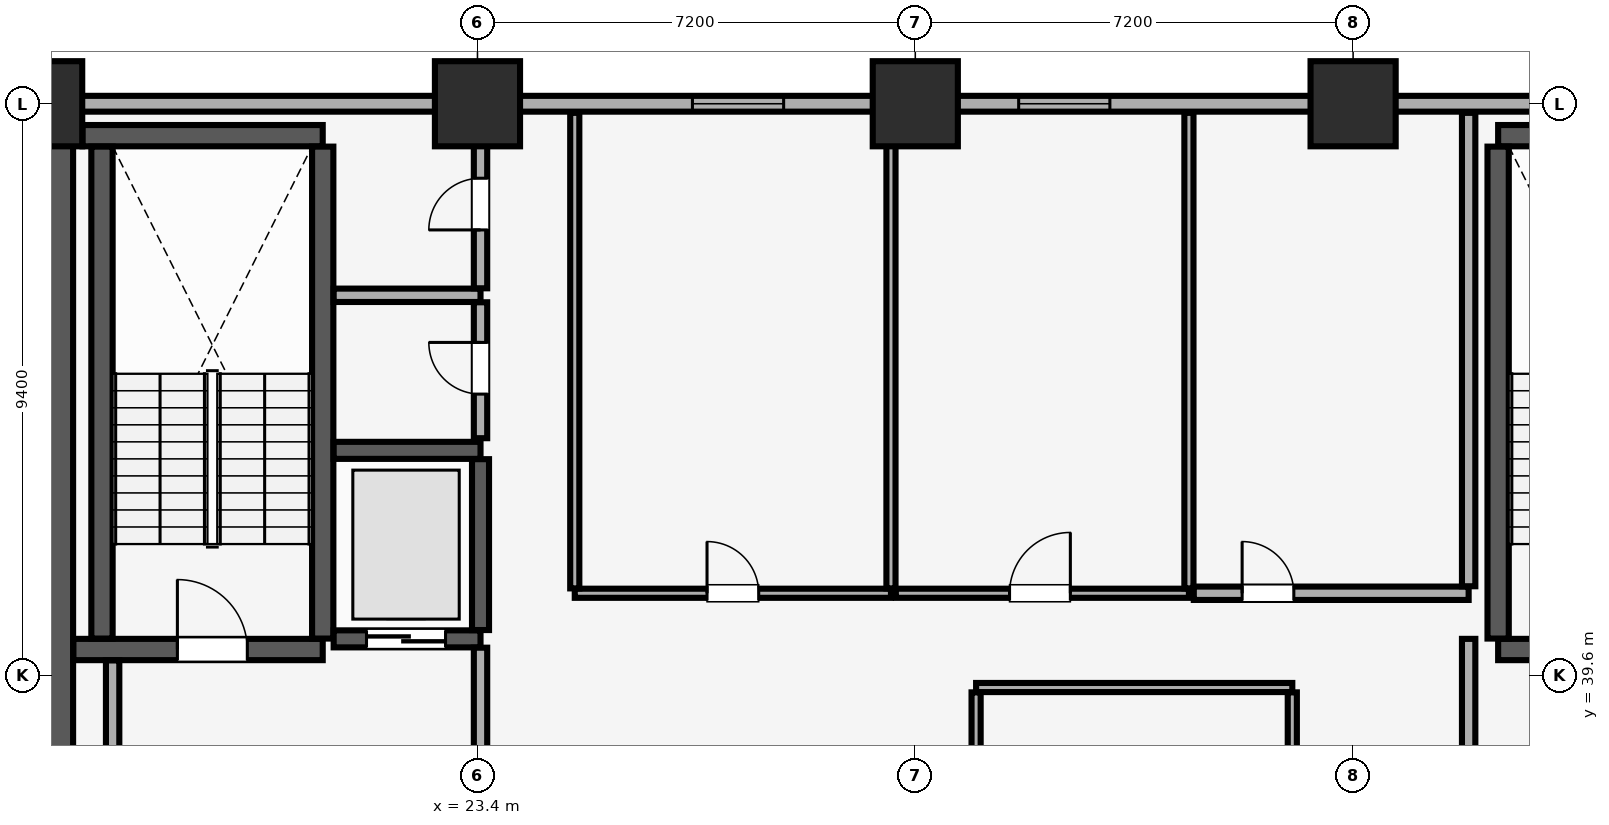
"""IFC4 building model, lengths in metres.
Left out: names, types, materials, properties, quantities, classifications, styles, units other than length and angle.
Written with IfcOpenShell. Run it as: python <this file> out.ifc"""

import sys

from ifc_helpers import new_model, si_unit, direction, frame, frame_2d, origin, origin_2d, place, context, subcontext, project, spatial, rectangle, extrude, element, fill, save


model = new_model("IFC4")
c1 = context("Model", 3, precision=1e-05, world=origin(), true_north=direction((0.0, 1.0)))
c2 = subcontext(c1, "Body", "Model", "MODEL_VIEW")
j1 = project(units=[si_unit("LENGTHUNIT", "METRE"), si_unit("PLANEANGLEUNIT", "RADIAN")], contexts=[c1])
p1 = place(None, origin())
s1 = spatial("IfcSite", under=j1, at=p1, CompositionType="ELEMENT")
p2 = place(p1, origin())
s2 = spatial("IfcBuilding", under=s1, at=p2, CompositionType="ELEMENT")
p3 = place(p2, frame((0.0, 0.0, 31.4)))
s3 = spatial("IfcBuildingStorey", under=s2, at=p3, CompositionType="ELEMENT", Elevation=31.4)
for number, where, z_axis, x_axis in (
    (1, (16.2, 49.0, 0.0), (0.0, 0.0, 1.0), (1.0, 0.0, 0.0)),
    (2, (23.4, 49.0, 0.0), (0.0, 0.0, 1.0), (1.0, 0.0, 0.0)),
    (3, (30.6, 49.0, 0.0), (0.0, 0.0, 1.0), (1.0, 0.0, 0.0)),
    (4, (37.8, 49.0, 0.0), (0.0, 0.0, 1.0), (1.0, 0.0, 0.0)),
):
    element("IfcColumn", number, at=place(p3, frame(where, z_axis=z_axis, x_axis=x_axis)), inside=s3, PredefinedType="COLUMN", context=c2, shape_type="SweptSolid", body=[
        extrude(rectangle(XDim=1.4, YDim=1.4, at=origin_2d()), origin(), (0.0, 0.0, 1.0), 3.51),
    ])
p4 = place(p3, frame((79.8, 49.0, 0.0), z_axis=(0.0, 0.0, 1.0), x_axis=(-1.0, 0.0, 0.0)))
e5 = element("IfcWall", 5, at=p4, inside=s3, PredefinedType="SOLIDWALL", context=c2, shape_type="SweptSolid", body=[
    extrude(rectangle(XDim=75.6, YDim=0.26, at=frame_2d((37.8, 0.0))), origin(), (0.0, 0.0, 1.0), 2.56),
])
p5 = place(p4, frame((72.565, 0.0, 0.85)))
e6 = element("IfcOpeningElement", 6, at=p5, cuts=e5, PredefinedType="OPENING", context=c2, shape_type="SweptSolid", body=[
    extrude(rectangle(XDim=1.5, YDim=1.4, at=frame_2d((0.75, 0.7))), frame((0.0, 0.14, 0.0), z_axis=(0.0, -1.0, 0.0), x_axis=(1.0, 0.0, 0.0)), (0.0, 0.0, 1.0), 0.28),
])
p6 = place(p4, frame((67.45, 0.0, 0.85)))
e7 = element("IfcOpeningElement", 7, at=p6, cuts=e5, PredefinedType="OPENING", context=c2, shape_type="SweptSolid", body=[
    extrude(rectangle(XDim=1.5, YDim=1.4, at=frame_2d((0.75, 0.7))), frame((0.0, 0.14, 0.0), z_axis=(0.0, -1.0, 0.0), x_axis=(1.0, 0.0, 0.0)), (0.0, 0.0, 1.0), 0.28),
])
p7 = place(p4, frame((6.65, 0.0, 0.85)))
e8 = element("IfcOpeningElement", 8, at=p7, cuts=e5, PredefinedType="OPENING", context=c2, shape_type="SweptSolid", body=[
    extrude(rectangle(XDim=1.5, YDim=1.4, at=frame_2d((0.75, 0.7))), frame((0.0, 0.14, 0.0), z_axis=(0.0, -1.0, 0.0), x_axis=(1.0, 0.0, 0.0)), (0.0, 0.0, 1.0), 0.28),
])
p8 = place(p4, frame((1.535, 0.0, 0.85)))
e9 = element("IfcOpeningElement", 9, at=p8, cuts=e5, PredefinedType="OPENING", context=c2, shape_type="SweptSolid", body=[
    extrude(rectangle(XDim=1.5, YDim=1.4, at=frame_2d((0.75, 0.7))), frame((0.0, 0.14, 0.0), z_axis=(0.0, -1.0, 0.0), x_axis=(1.0, 0.0, 0.0)), (0.0, 0.0, 1.0), 0.28),
])
p9 = place(p4, frame((51.365, 0.0, 0.9)))
e10 = element("IfcOpeningElement", 10, at=p9, cuts=e5, PredefinedType="OPENING", context=c2, shape_type="SweptSolid", body=[
    extrude(rectangle(XDim=1.5, YDim=1.4, at=frame_2d((0.75, 0.7))), frame((0.0, 0.14, 0.0), z_axis=(0.0, -1.0, 0.0), x_axis=(1.0, 0.0, 0.0)), (0.0, 0.0, 1.0), 0.28),
])
p10 = place(p4, frame((46.0, 0.0, 0.9)))
e11 = element("IfcOpeningElement", 11, at=p10, cuts=e5, PredefinedType="OPENING", context=c2, shape_type="SweptSolid", body=[
    extrude(rectangle(XDim=1.5, YDim=1.4, at=frame_2d((0.75, 0.7))), frame((0.0, 0.14, 0.0), z_axis=(0.0, -1.0, 0.0), x_axis=(1.0, 0.0, 0.0)), (0.0, 0.0, 1.0), 0.28),
])
p11 = place(p4, frame((29.15, 0.0, 0.9)))
e12 = element("IfcOpeningElement", 12, at=p11, cuts=e5, PredefinedType="OPENING", context=c2, shape_type="SweptSolid", body=[
    extrude(rectangle(XDim=1.5, YDim=1.4, at=frame_2d((0.75, 0.7))), frame((0.0, 0.14, 0.0), z_axis=(0.0, -1.0, 0.0), x_axis=(1.0, 0.0, 0.0)), (0.0, 0.0, 1.0), 0.28),
])
p12 = place(p4, frame((23.485, 0.0, 0.9)))
e13 = element("IfcOpeningElement", 13, at=p12, cuts=e5, PredefinedType="OPENING", context=c2, shape_type="SweptSolid", body=[
    extrude(rectangle(XDim=1.5, YDim=1.4, at=frame_2d((0.75, 0.7))), frame((0.0, 0.14, 0.0), z_axis=(0.0, -1.0, 0.0), x_axis=(1.0, 0.0, 0.0)), (0.0, 0.0, 1.0), 0.28),
])
p13 = place(p3, frame((16.2, 29.4, 0.0), z_axis=(0.0, 0.0, 1.0), x_axis=(0.0, 1.0, 0.0)))
e14 = element("IfcWall", 14, at=p13, inside=s3, PredefinedType="SHEAR", context=c2, shape_type="SweptSolid", body=[
    extrude(rectangle(XDim=19.2, YDim=1.1, at=frame_2d((9.6, 0.0))), origin(), (0.0, 0.0, 1.0), 3.51),
])
p14 = place(p3, frame((16.755, 40.025, 0.0), z_axis=(0.0, 0.0, 1.0), x_axis=(1.0, 0.0, 0.0)))
e15 = element("IfcWall", 15, at=p14, inside=s3, PredefinedType="SHEAR", context=c2, shape_type="SweptSolid", body=[
    extrude(rectangle(XDim=4.1, YDim=0.35, at=frame_2d((2.05, 0.0))), origin(), (0.0, 0.0, 1.0), 3.51),
])
p15 = place(p14, frame((1.71, 0.0, 0.0)))
e16 = element("IfcOpeningElement", 16, at=p15, cuts=e15, PredefinedType="OPENING", context=c2, shape_type="SweptSolid", body=[
    extrude(rectangle(XDim=1.15, YDim=2.15, at=frame_2d((0.575, 1.075))), frame((0.0, 0.185, 0.0), z_axis=(0.0, -1.0, 0.0), x_axis=(1.0, 0.0, 0.0)), (0.0, 0.0, 1.0), 0.37),
])
p16 = place(p3, frame((16.905, 48.475, 0.0), z_axis=(0.0, 0.0, 1.0), x_axis=(1.0, 0.0, 0.0)))
e17 = element("IfcWall", 17, at=p16, inside=s3, PredefinedType="SHEAR", context=c2, shape_type="SweptSolid", body=[
    extrude(rectangle(XDim=3.95, YDim=0.35, at=frame_2d((1.975, 0.0))), origin(), (0.0, 0.0, 1.0), 3.51),
])
for number, where, z_axis, x_axis in (
    (18, (17.225, 40.205, 0.0), (0.0, 0.0, 1.0), (0.0, 1.0, 0.0)),
    (19, (20.855, 40.205, 0.0), (0.0, 0.0, 1.0), (0.0, 1.0, 0.0)),
):
    element("IfcWall", number, at=place(p3, frame(where, z_axis=z_axis, x_axis=x_axis)), inside=s3, PredefinedType="SHEAR", context=c2, shape_type="SweptSolid", body=[
        extrude(rectangle(XDim=8.09, YDim=0.35, at=frame_2d((4.045, 0.0))), origin(), (0.0, 0.0, 1.0), 3.51),
    ])
p17 = place(p3, frame((40.185, 40.025, 0.0), z_axis=(0.0, 0.0, 1.0), x_axis=(1.0, 0.0, 0.0)))
e20 = element("IfcWall", 20, at=p17, inside=s3, PredefinedType="SHEAR", context=c2, shape_type="SweptSolid", body=[
    extrude(rectangle(XDim=3.63, YDim=0.35, at=frame_2d((1.815, 0.0))), origin(), (0.0, 0.0, 1.0), 3.51),
])
p18 = place(p17, frame((1.24, 0.0, 0.0)))
e21 = element("IfcOpeningElement", 21, at=p18, cuts=e20, PredefinedType="OPENING", context=c2, shape_type="SweptSolid", body=[
    extrude(rectangle(XDim=1.15, YDim=2.15, at=frame_2d((0.575, 1.075))), frame((0.0, 0.185, 0.0), z_axis=(0.0, -1.0, 0.0), x_axis=(1.0, 0.0, 0.0)), (0.0, 0.0, 1.0), 0.37),
])
p19 = place(p3, frame((40.185, 48.475, 0.0), z_axis=(0.0, 0.0, 1.0), x_axis=(1.0, 0.0, 0.0)))
e22 = element("IfcWall", 22, at=p19, inside=s3, PredefinedType="SHEAR", context=c2, shape_type="SweptSolid", body=[
    extrude(rectangle(XDim=3.63, YDim=0.35, at=frame_2d((1.815, 0.0))), origin(), (0.0, 0.0, 1.0), 3.51),
])
p20 = place(p3, frame((40.185, 40.205, 0.0), z_axis=(0.0, 0.0, 1.0), x_axis=(0.0, 1.0, 0.0)))
e23 = element("IfcWall", 23, at=p20, inside=s3, PredefinedType="SHEAR", context=c2, shape_type="SweptSolid", body=[
    extrude(rectangle(XDim=8.09, YDim=0.35, at=frame_2d((4.045, 0.0))), origin(), (0.0, 0.0, 1.0), 3.51),
])
p21 = place(p3, frame((21.035, 40.2, 0.0), z_axis=(0.0, 0.0, 1.0), x_axis=(1.0, 0.0, 0.0)))
e24 = element("IfcWall", 24, at=p21, inside=s3, PredefinedType="SHEAR", context=c2, shape_type="SweptSolid", body=[
    extrude(rectangle(XDim=2.415, YDim=0.28, at=frame_2d((1.208, 0.0))), origin(), (0.0, 0.0, 1.0), 3.51),
])
p22 = place(p21, frame((0.54, 0.0, 0.0)))
e25 = element("IfcOpeningElement", 25, at=p22, cuts=e24, PredefinedType="OPENING", context=c2, shape_type="SweptSolid", body=[
    extrude(rectangle(XDim=1.3, YDim=2.3, at=frame_2d((0.65, 1.15))), frame((0.0, 0.15, 0.0), z_axis=(0.0, -1.0, 0.0), x_axis=(1.0, 0.0, 0.0)), (0.0, 0.0, 1.0), 0.3),
])
p23 = place(p3, frame((21.035, 43.3, 0.0), z_axis=(0.0, 0.0, 1.0), x_axis=(1.0, 0.0, 0.0)))
e26 = element("IfcWall", 26, at=p23, inside=s3, PredefinedType="SHEAR", context=c2, shape_type="SweptSolid", body=[
    extrude(rectangle(XDim=2.415, YDim=0.28, at=frame_2d((1.208, 0.0))), origin(), (0.0, 0.0, 1.0), 3.51),
])
p24 = place(p3, frame((23.45, 40.345, 0.0), z_axis=(0.0, 0.0, 1.0), x_axis=(0.0, 1.0, 0.0)))
e27 = element("IfcWall", 27, at=p24, inside=s3, PredefinedType="SHEAR", context=c2, shape_type="SweptSolid", body=[
    extrude(rectangle(XDim=2.81, YDim=0.28, at=frame_2d((1.405, 0.0))), origin(), (0.0, 0.0, 1.0), 3.51),
])
p25 = place(p3, frame((17.4, 34.415, 0.0), z_axis=(0.0, 0.0, 1.0), x_axis=(0.0, 1.0, 0.0)))
e28 = element("IfcWall", 28, at=p25, inside=s3, PredefinedType="PARTITIONING", context=c2, shape_type="SweptSolid", body=[
    extrude(rectangle(XDim=5.43, YDim=0.22, at=frame_2d((2.715, 0.0))), origin(), (0.0, 0.0, 1.0), 3.51),
])
p26 = place(p3, frame((23.45, 34.415, 0.0), z_axis=(0.0, 0.0, 1.0), x_axis=(0.0, 1.0, 0.0)))
e29 = element("IfcWall", 29, at=p26, inside=s3, PredefinedType="PARTITIONING", context=c2, shape_type="SweptSolid", body=[
    extrude(rectangle(XDim=5.64, YDim=0.22, at=frame_2d((2.82, 0.0))), origin(), (0.0, 0.0, 1.0), 3.51),
])
p27 = place(p3, frame((39.7, 34.415, 0.0), z_axis=(0.0, 0.0, 1.0), x_axis=(0.0, 1.0, 0.0)))
e30 = element("IfcWall", 30, at=p27, inside=s3, PredefinedType="PARTITIONING", context=c2, shape_type="SweptSolid", body=[
    extrude(rectangle(XDim=5.785, YDim=0.22, at=frame_2d((2.893, 0.0))), origin(), (0.0, 0.0, 1.0), 3.51),
])
p28 = place(p3, frame((21.035, 45.85, 0.0), z_axis=(0.0, 0.0, 1.0), x_axis=(1.0, 0.0, 0.0)))
e31 = element("IfcWall", 31, at=p28, inside=s3, PredefinedType="PARTITIONING", context=c2, shape_type="SweptSolid", body=[
    extrude(rectangle(XDim=2.415, YDim=0.22, at=frame_2d((1.208, 0.0))), origin(), (0.0, 0.0, 1.0), 3.51),
])
p29 = place(p3, frame((23.45, 43.5, 0.0), z_axis=(0.0, 0.0, 1.0), x_axis=(0.0, 1.0, 0.0)))
e32 = element("IfcWall", 32, at=p29, inside=s3, PredefinedType="PARTITIONING", context=c2, shape_type="SweptSolid", body=[
    extrude(rectangle(XDim=2.235, YDim=0.22, at=frame_2d((1.118, 0.0))), origin(), (0.0, 0.0, 1.0), 3.51),
])
p30 = place(p29, frame((0.725, 0.0, 0.0)))
e33 = element("IfcOpeningElement", 33, at=p30, cuts=e32, PredefinedType="OPENING", context=c2, shape_type="SweptSolid", body=[
    extrude(rectangle(XDim=0.85, YDim=2.1, at=frame_2d((0.425, 1.05))), frame((0.0, 0.12, 0.0), z_axis=(0.0, -1.0, 0.0), x_axis=(1.0, 0.0, 0.0)), (0.0, 0.0, 1.0), 0.24),
])
p31 = place(p3, frame((23.45, 45.965, 0.0), z_axis=(0.0, 0.0, 1.0), x_axis=(0.0, 1.0, 0.0)))
e34 = element("IfcWall", 34, at=p31, inside=s3, PredefinedType="PARTITIONING", context=c2, shape_type="SweptSolid", body=[
    extrude(rectangle(XDim=2.885, YDim=0.22, at=frame_2d((1.442, 0.0))), origin(), (0.0, 0.0, 1.0), 3.51),
])
p32 = place(p31, frame((0.96, 0.0, 0.0)))
e35 = element("IfcOpeningElement", 35, at=p32, cuts=e34, PredefinedType="OPENING", context=c2, shape_type="SweptSolid", body=[
    extrude(rectangle(XDim=0.85, YDim=2.1, at=frame_2d((0.425, 1.05))), frame((0.0, 0.12, 0.0), z_axis=(0.0, -1.0, 0.0), x_axis=(1.0, 0.0, 0.0)), (0.0, 0.0, 1.0), 0.24),
])
p33 = place(p3, frame((31.6, 39.4, 0.0), z_axis=(0.0, 0.0, 1.0), x_axis=(1.0, 0.0, 0.0)))
e36 = element("IfcWall", 36, at=p33, inside=s3, PredefinedType="PARTITIONING", context=c2, shape_type="SweptSolid", body=[
    extrude(rectangle(XDim=5.2, YDim=0.15, at=frame_2d((2.6, 0.0))), origin(), (0.0, 0.0, 1.0), 3.51),
])
for number, where, z_axis, x_axis in (
    (37, (31.6, 34.38, 0.0), (0.0, 0.0, 1.0), (0.0, 1.0, 0.0)),
    (38, (36.8, 34.38, 0.0), (0.0, 0.0, 1.0), (0.0, 1.0, 0.0)),
):
    element("IfcWall", number, at=place(p3, frame(where, z_axis=z_axis, x_axis=x_axis)), inside=s3, PredefinedType="PARTITIONING", context=c2, shape_type="SweptSolid", body=[
        extrude(rectangle(XDim=4.94, YDim=0.15, at=frame_2d((2.47, 0.0))), origin(), (0.0, 0.0, 1.0), 3.51),
    ])
p34 = place(p3, frame((25.0, 40.95, 0.0), z_axis=(0.0, 0.0, 1.0), x_axis=(1.0, 0.0, 0.0)))
e39 = element("IfcWall", 39, at=p34, inside=s3, PredefinedType="PARTITIONING", context=c2, shape_type="SweptSolid", body=[
    extrude(rectangle(XDim=5.2, YDim=0.15, at=frame_2d((2.6, 0.0))), origin(), (0.0, 0.0, 1.0), 3.51),
])
p35 = place(p34, frame((2.175, 0.0, 0.0)))
e40 = element("IfcOpeningElement", 40, at=p35, cuts=e39, PredefinedType="OPENING", context=c2, shape_type="SweptSolid", body=[
    extrude(rectangle(XDim=0.85, YDim=2.1, at=frame_2d((0.425, 1.05))), frame((0.0, 0.085, 0.0), z_axis=(0.0, -1.0, 0.0), x_axis=(1.0, 0.0, 0.0)), (0.0, 0.0, 1.0), 0.17),
])
for number, where, z_axis, x_axis in (
    (41, (25.0, 41.03, 0.0), (0.0, 0.0, 1.0), (0.0, 1.0, 0.0)),
    (42, (30.2, 41.03, 0.0), (0.0, 0.0, 1.0), (0.0, 1.0, 0.0)),
):
    element("IfcWall", number, at=place(p3, frame(where, z_axis=z_axis, x_axis=x_axis)), inside=s3, PredefinedType="PARTITIONING", context=c2, shape_type="SweptSolid", body=[
        extrude(rectangle(XDim=7.82, YDim=0.15, at=frame_2d((3.91, 0.0))), origin(), (0.0, 0.0, 1.0), 3.51),
    ])
p36 = place(p3, frame((30.28, 40.95, 0.0), z_axis=(0.0, 0.0, 1.0), x_axis=(1.0, 0.0, 0.0)))
e43 = element("IfcWall", 43, at=p36, inside=s3, PredefinedType="PARTITIONING", context=c2, shape_type="SweptSolid", body=[
    extrude(rectangle(XDim=4.82, YDim=0.15, at=frame_2d((2.41, 0.0))), origin(), (0.0, 0.0, 1.0), 3.51),
])
p37 = place(p36, frame((1.87, 0.0, 0.0)))
e44 = element("IfcOpeningElement", 44, at=p37, cuts=e43, PredefinedType="OPENING", context=c2, shape_type="SweptSolid", body=[
    extrude(rectangle(XDim=1.0, YDim=2.15, at=frame_2d((0.5, 1.075))), frame((0.0, 0.085, 0.0), z_axis=(0.0, -1.0, 0.0), x_axis=(1.0, 0.0, 0.0)), (0.0, 0.0, 1.0), 0.17),
])
p38 = place(p3, frame((35.1, 41.03, 0.0), z_axis=(0.0, 0.0, 1.0), x_axis=(0.0, 1.0, 0.0)))
e45 = element("IfcWall", 45, at=p38, inside=s3, PredefinedType="PARTITIONING", context=c2, shape_type="SweptSolid", body=[
    extrude(rectangle(XDim=7.82, YDim=0.15, at=frame_2d((3.91, 0.0))), origin(), (0.0, 0.0, 1.0), 3.51),
])
p39 = place(p3, frame((35.18, 40.95, 0.0), z_axis=(0.0, 0.0, 1.0), x_axis=(1.0, 0.0, 0.0)))
e46 = element("IfcWall", 46, at=p39, inside=s3, PredefinedType="PARTITIONING", context=c2, shape_type="SweptSolid", body=[
    extrude(rectangle(XDim=4.52, YDim=0.22, at=frame_2d((2.26, 0.0))), origin(), (0.0, 0.0, 1.0), 3.51),
])
p40 = place(p39, frame((0.795, 0.0, 0.0)))
e47 = element("IfcOpeningElement", 47, at=p40, cuts=e46, PredefinedType="OPENING", context=c2, shape_type="SweptSolid", body=[
    extrude(rectangle(XDim=0.85, YDim=2.1, at=frame_2d((0.425, 1.05))), frame((0.0, 0.12, 0.0), z_axis=(0.0, -1.0, 0.0), x_axis=(1.0, 0.0, 0.0)), (0.0, 0.0, 1.0), 0.24),
])
p41 = place(p3, frame((39.7, 41.065, 0.0), z_axis=(0.0, 0.0, 1.0), x_axis=(0.0, 1.0, 0.0)))
e48 = element("IfcWall", 48, at=p41, inside=s3, PredefinedType="PARTITIONING", context=c2, shape_type="SweptSolid", body=[
    extrude(rectangle(XDim=7.785, YDim=0.22, at=frame_2d((3.893, 0.0))), origin(), (0.0, 0.0, 1.0), 3.51),
])
p42 = place(p9, origin())
e49 = element("IfcWindow", 49, at=p42, inside=s3, PartitioningType="SINGLE_PANEL", PredefinedType="WINDOW", context=c2, shape_type="SweptSolid", body=[
    extrude(rectangle(XDim=1.5, YDim=1.4, at=frame_2d((0.75, 0.7))), frame((0.0, 0.03, 0.0), z_axis=(0.0, -1.0, 0.0), x_axis=(1.0, 0.0, 0.0)), (0.0, 0.0, 1.0), 0.06),
])
fill(e10, e49)
p43 = place(p10, origin())
e50 = element("IfcWindow", 50, at=p43, inside=s3, PartitioningType="SINGLE_PANEL", PredefinedType="WINDOW", context=c2, shape_type="SweptSolid", body=[
    extrude(rectangle(XDim=1.5, YDim=1.4, at=frame_2d((0.75, 0.7))), frame((0.0, 0.03, 0.0), z_axis=(0.0, -1.0, 0.0), x_axis=(1.0, 0.0, 0.0)), (0.0, 0.0, 1.0), 0.06),
])
fill(e11, e50)
p44 = place(p15, origin())
e51 = element("IfcDoor", 51, at=p44, inside=s3, OperationType="SINGLE_SWING_LEFT", PredefinedType="DOOR", context=c2, shape_type="SweptSolid", body=[
    extrude(rectangle(XDim=1.15, YDim=2.15, at=frame_2d((0.575, 1.075))), frame((0.0, 0.025, 0.0), z_axis=(0.0, -1.0, 0.0), x_axis=(1.0, 0.0, 0.0)), (0.0, 0.0, 1.0), 0.05),
])
fill(e16, e51)
p45 = place(p22, origin())
e52 = element("IfcDoor", 52, at=p45, inside=s3, OperationType="DOUBLE_DOOR_SLIDING", PredefinedType="DOOR", context=c2, shape_type="SweptSolid", body=[
    extrude(rectangle(XDim=1.3, YDim=2.3, at=frame_2d((0.65, 1.15))), frame((0.0, 0.025, 0.0), z_axis=(0.0, -1.0, 0.0), x_axis=(1.0, 0.0, 0.0)), (0.0, 0.0, 1.0), 0.05),
])
fill(e25, e52)
p46 = place(p30, origin())
e53 = element("IfcDoor", 53, at=p46, inside=s3, OperationType="SINGLE_SWING_RIGHT", PredefinedType="DOOR", context=c2, shape_type="SweptSolid", body=[
    extrude(rectangle(XDim=0.85, YDim=2.1, at=frame_2d((0.425, 1.05))), frame((0.0, 0.025, 0.0), z_axis=(0.0, -1.0, 0.0), x_axis=(1.0, 0.0, 0.0)), (0.0, 0.0, 1.0), 0.05),
])
fill(e33, e53)
p47 = place(p32, origin())
e54 = element("IfcDoor", 54, at=p47, inside=s3, OperationType="SINGLE_SWING_LEFT", PredefinedType="DOOR", context=c2, shape_type="SweptSolid", body=[
    extrude(rectangle(XDim=0.85, YDim=2.1, at=frame_2d((0.425, 1.05))), frame((0.0, 0.025, 0.0), z_axis=(0.0, -1.0, 0.0), x_axis=(1.0, 0.0, 0.0)), (0.0, 0.0, 1.0), 0.05),
])
fill(e35, e54)
p48 = place(p35, origin())
e55 = element("IfcDoor", 55, at=p48, inside=s3, OperationType="SINGLE_SWING_LEFT", PredefinedType="DOOR", context=c2, shape_type="SweptSolid", body=[
    extrude(rectangle(XDim=0.85, YDim=2.1, at=frame_2d((0.425, 1.05))), frame((0.0, 0.025, 0.0), z_axis=(0.0, -1.0, 0.0), x_axis=(1.0, 0.0, 0.0)), (0.0, 0.0, 1.0), 0.05),
])
fill(e40, e55)
p49 = place(p37, origin())
e56 = element("IfcDoor", 56, at=p49, inside=s3, OperationType="SINGLE_SWING_RIGHT", PredefinedType="DOOR", context=c2, shape_type="SweptSolid", body=[
    extrude(rectangle(XDim=1.0, YDim=2.15, at=frame_2d((0.5, 1.075))), frame((0.0, 0.025, 0.0), z_axis=(0.0, -1.0, 0.0), x_axis=(1.0, 0.0, 0.0)), (0.0, 0.0, 1.0), 0.05),
])
fill(e44, e56)
p50 = place(p40, origin())
e57 = element("IfcDoor", 57, at=p50, inside=s3, OperationType="SINGLE_SWING_LEFT", PredefinedType="DOOR", context=c2, shape_type="SweptSolid", body=[
    extrude(rectangle(XDim=0.85, YDim=2.1, at=frame_2d((0.425, 1.05))), frame((0.0, 0.025, 0.0), z_axis=(0.0, -1.0, 0.0), x_axis=(1.0, 0.0, 0.0)), (0.0, 0.0, 1.0), 0.05),
])
fill(e47, e57)
save(model, sys.argv[1])
